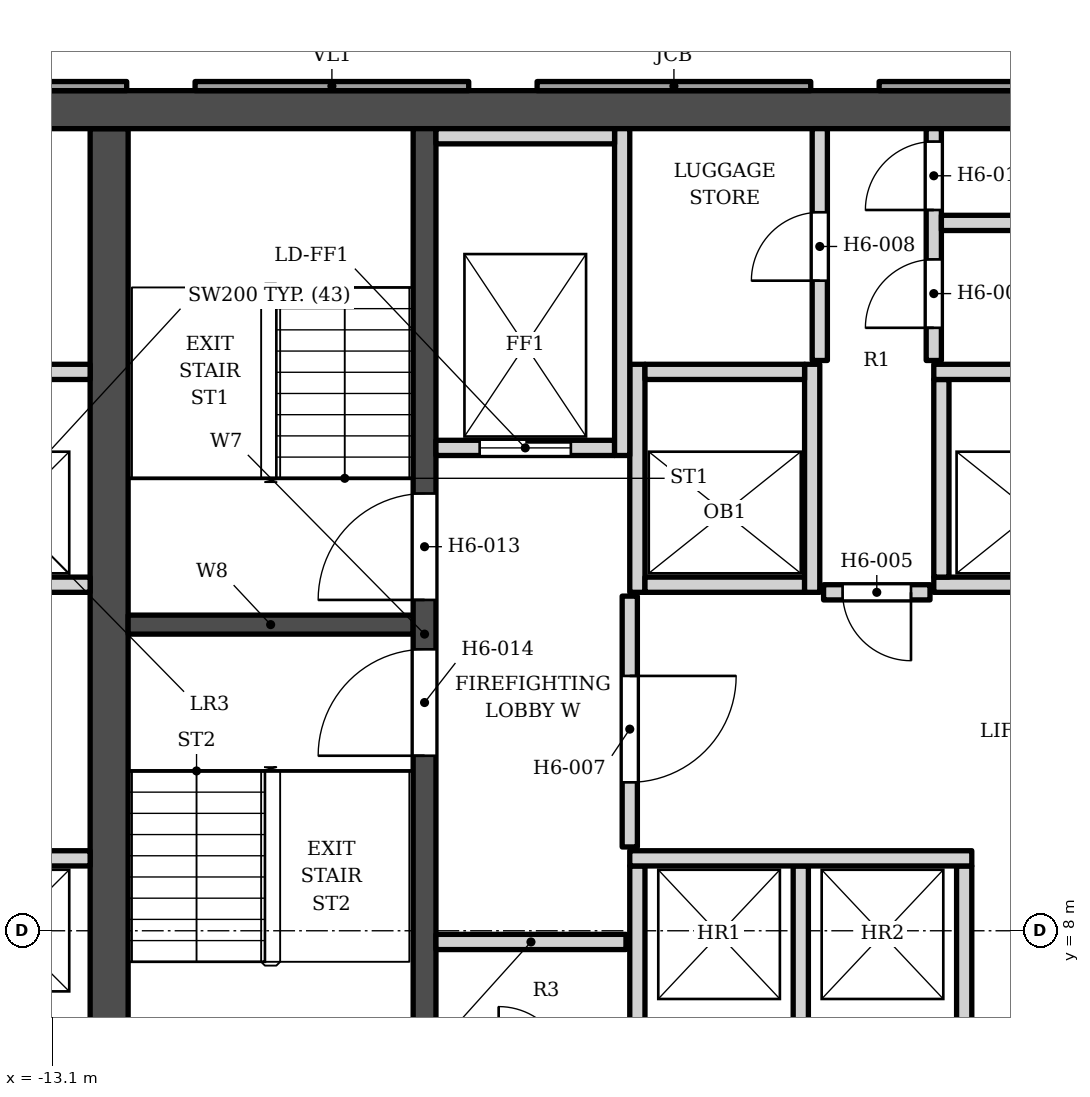
"""IFC4 building model, lengths in metres.
Left out: names, types, materials, properties, quantities, classifications, styles, units other than length and angle.
Written with IfcOpenShell. Run it as: python <this file> out.ifc"""

import sys

from ifc_helpers import new_model, si_unit, direction, frame, frame_2d, origin, place, context, subcontext, project, spatial, polyline, rectangle, outline, extrude, element, fill, save


model = new_model("IFC4")
c1 = context("Model", 3, precision=1e-05, world=origin(), true_north=direction((0.0, 1.0)))
c2 = subcontext(c1, "Body", "Model", "MODEL_VIEW")
j1 = project(units=[si_unit("LENGTHUNIT", "METRE"), si_unit("PLANEANGLEUNIT", "RADIAN")], contexts=[c1])
p1 = place(None, origin())
s1 = spatial("IfcSite", under=j1, at=p1, CompositionType="ELEMENT")
p2 = place(p1, origin())
s2 = spatial("IfcBuilding", under=s1, at=p2, CompositionType="ELEMENT")
p3 = place(p2, frame((0.0, 0.0, 102.0)))
s3 = spatial("IfcBuildingStorey", under=s2, at=p3, CompositionType="ELEMENT", Elevation=102.0)
p4 = place(p3, frame((-16.9, 18.802, 0.0), z_axis=(0.0, 0.0, 1.0), x_axis=(1.0, 0.0, 0.0)))
e1 = element("IfcWall", 1, at=p4, inside=s3, PredefinedType="SHEAR", context=c2, shape_type="SweptSolid", body=[
    extrude(rectangle(XDim=33.8, YDim=0.5, at=frame_2d((16.9, 0.0))), origin(), (0.0, 0.0, 1.0), 3.4),
])
p5 = place(p3, frame((-12.35, 5.253, 0.0), z_axis=(0.0, 0.0, 1.0), x_axis=(0.0, 1.0, 0.0)))
e2 = element("IfcWall", 2, at=p5, inside=s3, PredefinedType="SHEAR", context=c2, shape_type="SweptSolid", body=[
    extrude(rectangle(XDim=13.3, YDim=0.5, at=frame_2d((6.65, 0.0))), origin(), (0.0, 0.0, 1.0), 3.4),
])
p6 = place(p3, frame((-8.2, 5.253, 0.0), z_axis=(0.0, 0.0, 1.0), x_axis=(0.0, 1.0, 0.0)))
e3 = element("IfcWall", 3, at=p6, inside=s3, PredefinedType="SHEAR", context=c2, shape_type="SweptSolid", body=[
    extrude(rectangle(XDim=13.3, YDim=0.3, at=frame_2d((6.65, 0.0))), origin(), (0.0, 0.0, 1.0), 3.4),
])
p7 = place(p6, frame((7.1, 0.0, 0.0)))
e4 = element("IfcOpeningElement", 4, at=p7, cuts=e3, PredefinedType="OPENING", context=c2, shape_type="SweptSolid", body=[
    extrude(rectangle(XDim=1.4, YDim=2.1, at=frame_2d((0.7, 1.05))), frame((0.0, 0.16, 0.0), z_axis=(0.0, -1.0, 0.0), x_axis=(1.0, 0.0, 0.0)), (0.0, 0.0, 1.0), 0.32),
])
p8 = place(p6, frame((5.05, 0.0, 0.0)))
e5 = element("IfcOpeningElement", 5, at=p8, cuts=e3, PredefinedType="OPENING", context=c2, shape_type="SweptSolid", body=[
    extrude(rectangle(XDim=1.4, YDim=2.1, at=frame_2d((0.7, 1.05))), frame((0.0, 0.16, 0.0), z_axis=(0.0, -1.0, 0.0), x_axis=(1.0, 0.0, 0.0)), (0.0, 0.0, 1.0), 0.32),
])
p9 = place(p3, frame((-12.1, 12.028, 0.0), z_axis=(0.0, 0.0, 1.0), x_axis=(1.0, 0.0, 0.0)))
e6 = element("IfcWall", 6, at=p9, inside=s3, PredefinedType="SHEAR", context=c2, shape_type="SweptSolid", body=[
    extrude(rectangle(XDim=3.75, YDim=0.25, at=frame_2d((1.875, 0.0))), origin(), (0.0, 0.0, 1.0), 3.4),
])
p10 = place(p3, origin())
e7 = element("IfcWall", 7, at=p10, inside=s3, PredefinedType="ELEMENTEDWALL", context=c2, shape_type="SweptSolid", body=[
    extrude(outline(polyline([(-2.219, 19.173), (-2.219, 19.052), (1.381, 19.052), (1.381, 19.173), (-2.219, 19.173)])), origin(), (0.0, 0.0, 1.0), 2.65),
])
p11 = place(p3, origin())
e8 = element("IfcWall", 8, at=p11, inside=s3, PredefinedType="SOLIDWALL", context=c2, shape_type="SweptSolid", body=[
    extrude(outline(polyline([(-6.719, 19.173), (-6.719, 19.052), (-3.119, 19.052), (-3.119, 19.173), (-6.719, 19.173)])), origin(), (0.0, 0.0, 1.0), 2.65),
])
p12 = place(p3, origin())
e9 = element("IfcWall", 9, at=p12, inside=s3, PredefinedType="ELEMENTEDWALL", context=c2, shape_type="SweptSolid", body=[
    extrude(outline(polyline([(-11.219, 19.173), (-11.219, 19.052), (-7.619, 19.052), (-7.619, 19.173), (-11.219, 19.173)])), origin(), (0.0, 0.0, 1.0), 2.65),
])
p13 = place(p3, origin())
e10 = element("IfcWall", 10, at=p13, inside=s3, PredefinedType="SOLIDWALL", context=c2, shape_type="SweptSolid", body=[
    extrude(outline(polyline([(-15.719, 19.173), (-15.719, 19.052), (-12.119, 19.052), (-12.119, 19.173), (-15.719, 19.173)])), origin(), (0.0, 0.0, 1.0), 2.65),
])
for number, where, z_axis, x_axis in (
    (11, (-5.4, 6.353, 0.0), (0.0, 0.0, 1.0), (0.0, 1.0, 0.0)),
    (12, (-3.25, 6.353, 0.0), (0.0, 0.0, 1.0), (0.0, 1.0, 0.0)),
    (13, (-1.1, 6.353, 0.0), (0.0, 0.0, 1.0), (0.0, 1.0, 0.0)),
    (14, (-8.05, 7.853, 0.0), (0.0, 0.0, 1.0), (1.0, 0.0, 0.0)),
):
    element("IfcWall", number, at=place(p3, frame(where, z_axis=z_axis, x_axis=x_axis)), inside=s3, PredefinedType="SOLIDWALL", context=c2, shape_type="SweptSolid", body=[
        extrude(rectangle(XDim=2.5, YDim=0.2, at=frame_2d((1.25, 0.0))), origin(), (0.0, 0.0, 1.0), 3.23),
    ])
p14 = place(p3, frame((-16.9, 8.953, 0.0), z_axis=(0.0, 0.0, 1.0), x_axis=(1.0, 0.0, 0.0)))
e15 = element("IfcWall", 15, at=p14, inside=s3, PredefinedType="SOLIDWALL", context=c2, shape_type="SweptSolid", body=[
    extrude(rectangle(XDim=4.3, YDim=0.2, at=frame_2d((2.15, 0.0))), origin(), (0.0, 0.0, 1.0), 3.23),
])
p15 = place(p14, frame((2.675, 0.0, 0.0)))
e16 = element("IfcOpeningElement", 16, at=p15, cuts=e15, PredefinedType="OPENING", context=c2, shape_type="SweptSolid", body=[
    extrude(rectangle(XDim=1.1, YDim=2.1, at=frame_2d((0.55, 1.05))), frame((0.0, 0.11, 0.0), z_axis=(0.0, -1.0, 0.0), x_axis=(1.0, 0.0, 0.0)), (0.0, 0.0, 1.0), 0.22),
])
p16 = place(p14, frame((0.425, 0.0, 0.0)))
e17 = element("IfcOpeningElement", 17, at=p16, cuts=e15, PredefinedType="OPENING", context=c2, shape_type="SweptSolid", body=[
    extrude(rectangle(XDim=1.1, YDim=2.1, at=frame_2d((0.55, 1.05))), frame((0.0, 0.11, 0.0), z_axis=(0.0, -1.0, 0.0), x_axis=(1.0, 0.0, 0.0)), (0.0, 0.0, 1.0), 0.22),
])
p17 = place(p3, frame((-5.5, 8.953, 0.0), z_axis=(0.0, 0.0, 1.0), x_axis=(1.0, 0.0, 0.0)))
e18 = element("IfcWall", 18, at=p17, inside=s3, PredefinedType="SOLIDWALL", context=c2, shape_type="SweptSolid", body=[
    extrude(rectangle(XDim=4.5, YDim=0.2, at=frame_2d((2.25, 0.0))), origin(), (0.0, 0.0, 1.0), 3.23),
])
p18 = place(p3, frame((-5.5, 9.103, 0.0), z_axis=(0.0, 0.0, 1.0), x_axis=(0.0, 1.0, 0.0)))
e19 = element("IfcWall", 19, at=p18, inside=s3, PredefinedType="SOLIDWALL", context=c2, shape_type="SweptSolid", body=[
    extrude(rectangle(XDim=3.3, YDim=0.2, at=frame_2d((1.65, 0.0))), origin(), (0.0, 0.0, 1.0), 3.23),
])
p19 = place(p18, frame((0.85, 0.0, 0.0)))
e20 = element("IfcOpeningElement", 20, at=p19, cuts=e19, PredefinedType="OPENING", context=c2, shape_type="SweptSolid", body=[
    extrude(rectangle(XDim=1.4, YDim=2.1, at=frame_2d((0.7, 1.05))), frame((0.0, 0.11, 0.0), z_axis=(0.0, -1.0, 0.0), x_axis=(1.0, 0.0, 0.0)), (0.0, 0.0, 1.0), 0.22),
])
p20 = place(p3, frame((-2.95, 12.453, 0.0), z_axis=(0.0, 0.0, 1.0), x_axis=(1.0, 0.0, 0.0)))
e21 = element("IfcWall", 21, at=p20, inside=s3, PredefinedType="SOLIDWALL", context=c2, shape_type="SweptSolid", body=[
    extrude(rectangle(XDim=1.4, YDim=0.2, at=frame_2d((0.7, 0.0))), origin(), (0.0, 0.0, 1.0), 3.23),
])
p21 = place(p20, frame((0.25, 0.0, 0.0)))
e22 = element("IfcOpeningElement", 22, at=p21, cuts=e21, PredefinedType="OPENING", context=c2, shape_type="SweptSolid", body=[
    extrude(rectangle(XDim=0.9, YDim=2.1, at=frame_2d((0.45, 1.05))), frame((0.0, 0.11, 0.0), z_axis=(0.0, -1.0, 0.0), x_axis=(1.0, 0.0, 0.0)), (0.0, 0.0, 1.0), 0.22),
])
p22 = place(p3, frame((-16.9, 12.552, 0.0), z_axis=(0.0, 0.0, 1.0), x_axis=(1.0, 0.0, 0.0)))
e23 = element("IfcWall", 23, at=p22, inside=s3, PredefinedType="SOLIDWALL", context=c2, shape_type="SweptSolid", body=[
    extrude(rectangle(XDim=4.3, YDim=0.2, at=frame_2d((2.15, 0.0))), origin(), (0.0, 0.0, 1.0), 3.23),
])
p23 = place(p22, frame((2.675, 0.0, 0.0)))
e24 = element("IfcOpeningElement", 24, at=p23, cuts=e23, PredefinedType="OPENING", context=c2, shape_type="SweptSolid", body=[
    extrude(rectangle(XDim=1.1, YDim=2.1, at=frame_2d((0.55, 1.05))), frame((0.0, 0.11, 0.0), z_axis=(0.0, -1.0, 0.0), x_axis=(1.0, 0.0, 0.0)), (0.0, 0.0, 1.0), 0.22),
])
p24 = place(p22, frame((0.425, 0.0, 0.0)))
e25 = element("IfcOpeningElement", 25, at=p24, cuts=e23, PredefinedType="OPENING", context=c2, shape_type="SweptSolid", body=[
    extrude(rectangle(XDim=1.1, YDim=2.1, at=frame_2d((0.55, 1.05))), frame((0.0, 0.11, 0.0), z_axis=(0.0, -1.0, 0.0), x_axis=(1.0, 0.0, 0.0)), (0.0, 0.0, 1.0), 0.22),
])
p25 = place(p3, frame((-5.4, 12.453, 0.0), z_axis=(0.0, 0.0, 1.0), x_axis=(0.0, 1.0, 0.0)))
e26 = element("IfcWall", 26, at=p25, inside=s3, PredefinedType="SOLIDWALL", context=c2, shape_type="SweptSolid", body=[
    extrude(rectangle(XDim=3.0, YDim=0.2, at=frame_2d((1.5, 0.0))), origin(), (0.0, 0.0, 1.0), 3.23),
])
p26 = place(p3, frame((-5.3, 12.552, 0.0), z_axis=(0.0, 0.0, 1.0), x_axis=(1.0, 0.0, 0.0)))
e27 = element("IfcWall", 27, at=p26, inside=s3, PredefinedType="SOLIDWALL", context=c2, shape_type="SweptSolid", body=[
    extrude(rectangle(XDim=2.1, YDim=0.2, at=frame_2d((1.05, 0.0))), origin(), (0.0, 0.0, 1.0), 3.23),
])
p27 = place(p3, frame((-3.1, 12.453, 0.0), z_axis=(0.0, 0.0, 1.0), x_axis=(0.0, 1.0, 0.0)))
e28 = element("IfcWall", 28, at=p27, inside=s3, PredefinedType="SOLIDWALL", context=c2, shape_type="SweptSolid", body=[
    extrude(rectangle(XDim=3.0, YDim=0.2, at=frame_2d((1.5, 0.0))), origin(), (0.0, 0.0, 1.0), 3.23),
])
p28 = place(p3, frame((-1.5, 12.552, 0.0), z_axis=(0.0, 0.0, 1.0), x_axis=(1.0, 0.0, 0.0)))
e29 = element("IfcWall", 29, at=p28, inside=s3, PredefinedType="SOLIDWALL", context=c2, shape_type="SweptSolid", body=[
    extrude(rectangle(XDim=7.0, YDim=0.2, at=frame_2d((3.5, 0.0))), origin(), (0.0, 0.0, 1.0), 3.23),
])
p29 = place(p3, frame((-1.4, 12.653, 0.0), z_axis=(0.0, 0.0, 1.0), x_axis=(0.0, 1.0, 0.0)))
e30 = element("IfcWall", 30, at=p29, inside=s3, PredefinedType="SOLIDWALL", context=c2, shape_type="SweptSolid", body=[
    extrude(rectangle(XDim=2.6, YDim=0.2, at=frame_2d((1.3, 0.0))), origin(), (0.0, 0.0, 1.0), 3.23),
])
p30 = place(p3, frame((-8.05, 14.353, 0.0), z_axis=(0.0, 0.0, 1.0), x_axis=(1.0, 0.0, 0.0)))
e31 = element("IfcWall", 31, at=p30, inside=s3, PredefinedType="SOLIDWALL", context=c2, shape_type="SweptSolid", body=[
    extrude(rectangle(XDim=2.35, YDim=0.2, at=frame_2d((1.175, 0.0))), origin(), (0.0, 0.0, 1.0), 3.23),
])
p31 = place(p30, frame((0.575, 0.0, 0.0)))
e32 = element("IfcOpeningElement", 32, at=p31, cuts=e31, PredefinedType="OPENING", context=c2, shape_type="SweptSolid", body=[
    extrude(rectangle(XDim=1.2, YDim=2.1, at=frame_2d((0.6, 1.05))), frame((0.0, 0.11, 0.0), z_axis=(0.0, -1.0, 0.0), x_axis=(1.0, 0.0, 0.0)), (0.0, 0.0, 1.0), 0.22),
])
for number, where, z_axis, x_axis in (
    (33, (-5.6, 14.253, 0.0), (0.0, 0.0, 1.0), (0.0, 1.0, 0.0)),
    (34, (-16.9, 15.353, 0.0), (0.0, 0.0, 1.0), (1.0, 0.0, 0.0)),
):
    element("IfcWall", number, at=place(p3, frame(where, z_axis=z_axis, x_axis=x_axis)), inside=s3, PredefinedType="SOLIDWALL", context=c2, shape_type="SweptSolid", body=[
        extrude(rectangle(XDim=4.3, YDim=0.2, at=frame_2d((2.15, 0.0))), origin(), (0.0, 0.0, 1.0), 3.23),
    ])
p32 = place(p3, frame((-5.3, 15.353, 0.0), z_axis=(0.0, 0.0, 1.0), x_axis=(1.0, 0.0, 0.0)))
e35 = element("IfcWall", 35, at=p32, inside=s3, PredefinedType="SOLIDWALL", context=c2, shape_type="SweptSolid", body=[
    extrude(rectangle(XDim=2.1, YDim=0.2, at=frame_2d((1.05, 0.0))), origin(), (0.0, 0.0, 1.0), 3.23),
])
p33 = place(p3, frame((-1.5, 15.353, 0.0), z_axis=(0.0, 0.0, 1.0), x_axis=(1.0, 0.0, 0.0)))
e36 = element("IfcWall", 36, at=p33, inside=s3, PredefinedType="SOLIDWALL", context=c2, shape_type="SweptSolid", body=[
    extrude(rectangle(XDim=7.2, YDim=0.2, at=frame_2d((3.6, 0.0))), origin(), (0.0, 0.0, 1.0), 3.23),
])
p34 = place(p3, frame((-3.0, 15.503, 0.0), z_axis=(0.0, 0.0, 1.0), x_axis=(0.0, 1.0, 0.0)))
e37 = element("IfcWall", 37, at=p34, inside=s3, PredefinedType="SOLIDWALL", context=c2, shape_type="SweptSolid", body=[
    extrude(rectangle(XDim=3.05, YDim=0.2, at=frame_2d((1.525, 0.0))), origin(), (0.0, 0.0, 1.0), 3.23),
])
p35 = place(p34, frame((1.05, 0.0, 0.0)))
e38 = element("IfcOpeningElement", 38, at=p35, cuts=e37, PredefinedType="OPENING", context=c2, shape_type="SweptSolid", body=[
    extrude(rectangle(XDim=0.9, YDim=2.1, at=frame_2d((0.45, 1.05))), frame((0.0, 0.11, 0.0), z_axis=(0.0, -1.0, 0.0), x_axis=(1.0, 0.0, 0.0)), (0.0, 0.0, 1.0), 0.22),
])
p36 = place(p3, frame((-1.5, 15.503, 0.0), z_axis=(0.0, 0.0, 1.0), x_axis=(0.0, 1.0, 0.0)))
e39 = element("IfcWall", 39, at=p36, inside=s3, PredefinedType="SOLIDWALL", context=c2, shape_type="SweptSolid", body=[
    extrude(rectangle(XDim=3.05, YDim=0.2, at=frame_2d((1.525, 0.0))), origin(), (0.0, 0.0, 1.0), 3.23),
])
p37 = place(p36, frame((0.43, 0.0, 0.0)))
e40 = element("IfcOpeningElement", 40, at=p37, cuts=e39, PredefinedType="OPENING", context=c2, shape_type="SweptSolid", body=[
    extrude(rectangle(XDim=0.9, YDim=2.1, at=frame_2d((0.45, 1.05))), frame((0.0, 0.11, 0.0), z_axis=(0.0, -1.0, 0.0), x_axis=(1.0, 0.0, 0.0)), (0.0, 0.0, 1.0), 0.22),
])
p38 = place(p36, frame((1.98, 0.0, 0.0)))
e41 = element("IfcOpeningElement", 41, at=p38, cuts=e39, PredefinedType="OPENING", context=c2, shape_type="SweptSolid", body=[
    extrude(rectangle(XDim=0.9, YDim=2.1, at=frame_2d((0.45, 1.05))), frame((0.0, 0.11, 0.0), z_axis=(0.0, -1.0, 0.0), x_axis=(1.0, 0.0, 0.0)), (0.0, 0.0, 1.0), 0.22),
])
p39 = place(p3, frame((-1.4, 17.312, 0.0), z_axis=(0.0, 0.0, 1.0), x_axis=(1.0, 0.0, 0.0)))
e42 = element("IfcWall", 42, at=p39, inside=s3, PredefinedType="SOLIDWALL", context=c2, shape_type="SweptSolid", body=[
    extrude(rectangle(XDim=6.85, YDim=0.2, at=frame_2d((3.425, 0.0))), origin(), (0.0, 0.0, 1.0), 3.23),
])
p40 = place(p3, frame((-8.05, 18.453, 0.0), z_axis=(0.0, 0.0, 1.0), x_axis=(1.0, 0.0, 0.0)))
e43 = element("IfcWall", 43, at=p40, inside=s3, PredefinedType="SOLIDWALL", context=c2, shape_type="SweptSolid", body=[
    extrude(rectangle(XDim=2.35, YDim=0.2, at=frame_2d((1.175, 0.0))), origin(), (0.0, 0.0, 1.0), 3.23),
])
p41 = place(p31, origin())
e44 = element("IfcDoor", 44, at=p41, inside=s3, OperationType="DOUBLE_DOOR_SLIDING", PredefinedType="DOOR", context=c2, shape_type="SweptSolid", body=[
    extrude(rectangle(XDim=1.2, YDim=2.1, at=frame_2d((0.6, 1.05))), frame((0.0, 0.025, 0.0), z_axis=(0.0, -1.0, 0.0), x_axis=(1.0, 0.0, 0.0)), (0.0, 0.0, 1.0), 0.05),
])
fill(e32, e44)
p42 = place(p7, origin())
e45 = element("IfcDoor", 45, at=p42, inside=s3, OperationType="SINGLE_SWING_LEFT", PredefinedType="DOOR", context=c2, shape_type="SweptSolid", body=[
    extrude(rectangle(XDim=1.4, YDim=2.1, at=frame_2d((0.7, 1.05))), frame((0.0, 0.025, 0.0), z_axis=(0.0, -1.0, 0.0), x_axis=(1.0, 0.0, 0.0)), (0.0, 0.0, 1.0), 0.05),
])
fill(e4, e45)
p43 = place(p8, origin())
e46 = element("IfcDoor", 46, at=p43, inside=s3, OperationType="SINGLE_SWING_LEFT", PredefinedType="DOOR", context=c2, shape_type="SweptSolid", body=[
    extrude(rectangle(XDim=1.4, YDim=2.1, at=frame_2d((0.7, 1.05))), frame((0.0, 0.025, 0.0), z_axis=(0.0, -1.0, 0.0), x_axis=(1.0, 0.0, 0.0)), (0.0, 0.0, 1.0), 0.05),
])
fill(e5, e46)
p44 = place(p21, origin())
e47 = element("IfcDoor", 47, at=p44, inside=s3, OperationType="SINGLE_SWING_RIGHT", PredefinedType="DOOR", context=c2, shape_type="SweptSolid", body=[
    extrude(rectangle(XDim=0.9, YDim=2.1, at=frame_2d((0.45, 1.05))), frame((0.0, 0.025, 0.0), z_axis=(0.0, -1.0, 0.0), x_axis=(1.0, 0.0, 0.0)), (0.0, 0.0, 1.0), 0.05),
])
fill(e22, e47)
p45 = place(p19, origin())
e48 = element("IfcDoor", 48, at=p45, inside=s3, OperationType="SINGLE_SWING_RIGHT", PredefinedType="DOOR", context=c2, shape_type="SweptSolid", body=[
    extrude(rectangle(XDim=1.4, YDim=2.1, at=frame_2d((0.7, 1.05))), frame((0.0, 0.025, 0.0), z_axis=(0.0, -1.0, 0.0), x_axis=(1.0, 0.0, 0.0)), (0.0, 0.0, 1.0), 0.05),
])
fill(e20, e48)
p46 = place(p35, origin())
e49 = element("IfcDoor", 49, at=p46, inside=s3, OperationType="SINGLE_SWING_LEFT", PredefinedType="DOOR", context=c2, shape_type="SweptSolid", body=[
    extrude(rectangle(XDim=0.9, YDim=2.1, at=frame_2d((0.45, 1.05))), frame((0.0, 0.025, 0.0), z_axis=(0.0, -1.0, 0.0), x_axis=(1.0, 0.0, 0.0)), (0.0, 0.0, 1.0), 0.05),
])
fill(e38, e49)
p47 = place(p37, origin())
e50 = element("IfcDoor", 50, at=p47, inside=s3, OperationType="SINGLE_SWING_LEFT", PredefinedType="DOOR", context=c2, shape_type="SweptSolid", body=[
    extrude(rectangle(XDim=0.9, YDim=2.1, at=frame_2d((0.45, 1.05))), frame((0.0, 0.025, 0.0), z_axis=(0.0, -1.0, 0.0), x_axis=(1.0, 0.0, 0.0)), (0.0, 0.0, 1.0), 0.05),
])
fill(e40, e50)
p48 = place(p38, origin())
e51 = element("IfcDoor", 51, at=p48, inside=s3, OperationType="SINGLE_SWING_LEFT", PredefinedType="DOOR", context=c2, shape_type="SweptSolid", body=[
    extrude(rectangle(XDim=0.9, YDim=2.1, at=frame_2d((0.45, 1.05))), frame((0.0, 0.025, 0.0), z_axis=(0.0, -1.0, 0.0), x_axis=(1.0, 0.0, 0.0)), (0.0, 0.0, 1.0), 0.05),
])
fill(e41, e51)
save(model, sys.argv[1])
